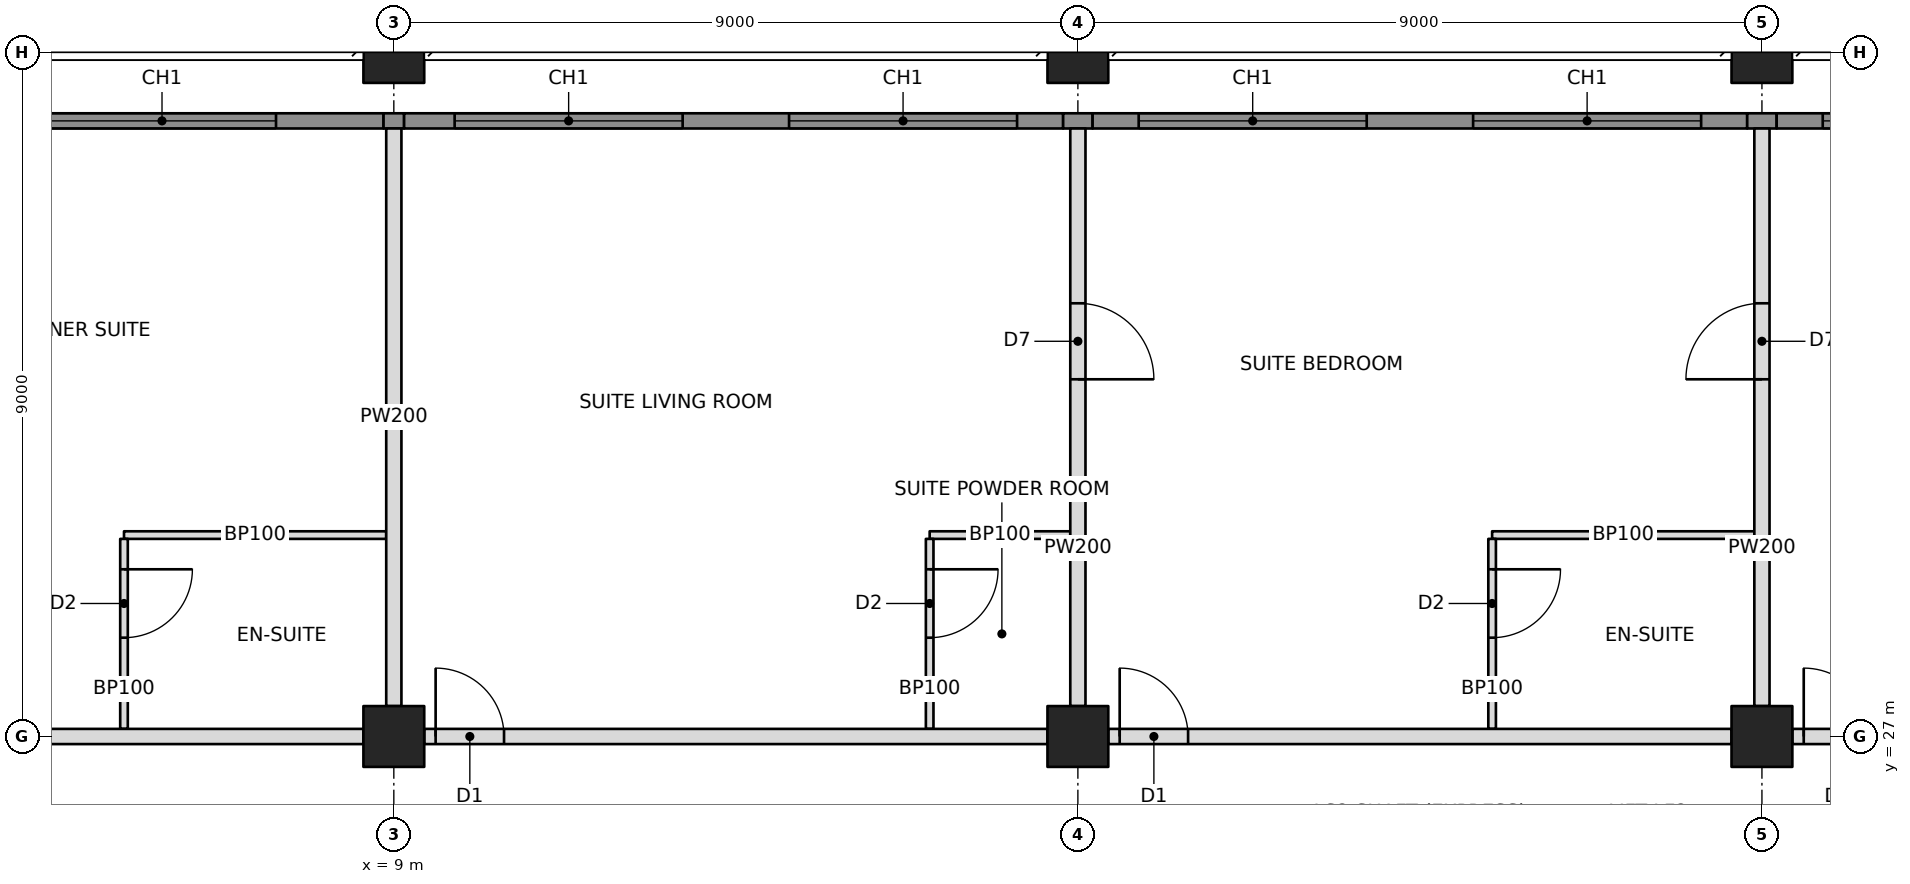
"""IFC4 building model, lengths in metres.
Left out: names, types, materials, properties, quantities, classifications, styles, units other than length and angle.
Written with IfcOpenShell. Run it as: python <this file> out.ifc"""

import sys

from ifc_helpers import new_model, si_unit, direction, frame, frame_2d, origin, origin_2d, place, context, subcontext, project, spatial, rectangle, hollow_rectangle, extrude, element, fill, save


model = new_model("IFC4")
c1 = context("Model", 3, precision=1e-05, world=origin(), true_north=direction((0.0, 1.0)))
c2 = subcontext(c1, "Body", "Model", "MODEL_VIEW")
j1 = project(units=[si_unit("LENGTHUNIT", "METRE"), si_unit("PLANEANGLEUNIT", "RADIAN")], contexts=[c1])
p1 = place(None, origin())
s1 = spatial("IfcSite", under=j1, at=p1, CompositionType="ELEMENT")
p2 = place(p1, origin())
s2 = spatial("IfcBuilding", under=s1, at=p2, CompositionType="ELEMENT")
p3 = place(p2, frame((0.0, 0.0, 28.0)))
s3 = spatial("IfcBuildingStorey", under=s2, at=p3, CompositionType="ELEMENT", Elevation=28.0)
for number, where, z_axis, x_axis in (
    (1, (9.0, 27.0, 0.0), (0.0, 0.0, 1.0), (1.0, 0.0, 0.0)),
    (2, (9.0, 36.0, 0.0), (0.0, 0.0, 1.0), (1.0, 0.0, 0.0)),
    (3, (18.0, 27.0, 0.0), (0.0, 0.0, 1.0), (1.0, 0.0, 0.0)),
    (4, (18.0, 36.0, 0.0), (0.0, 0.0, 1.0), (1.0, 0.0, 0.0)),
    (5, (27.0, 27.0, 0.0), (0.0, 0.0, 1.0), (1.0, 0.0, 0.0)),
    (6, (27.0, 36.0, 0.0), (0.0, 0.0, 1.0), (1.0, 0.0, 0.0)),
):
    element("IfcColumn", number, at=place(p3, frame(where, z_axis=z_axis, x_axis=x_axis)), inside=s3, PredefinedType="COLUMN", context=c2, shape_type="SweptSolid", body=[
        extrude(hollow_rectangle(XDim=0.8, YDim=0.8, WallThickness=0.1, at=origin_2d()), origin(), (0.0, 0.0, 1.0), 3.4),
    ])
p4 = place(p3, frame((3.0, 35.1, 0.0), z_axis=(0.0, 0.0, 1.0), x_axis=(1.0, 0.0, 0.0)))
e7 = element("IfcWall", 7, at=p4, inside=s3, PredefinedType="SOLIDWALL", context=c2, shape_type="SweptSolid", body=[
    extrude(rectangle(XDim=5.865, YDim=0.2, at=frame_2d((2.932, 0.0))), origin(), (0.0, 0.0, 1.0), 3.2),
])
p5 = place(p4, frame((1.45, 0.0, 0.6)))
e8 = element("IfcOpeningElement", 8, at=p5, cuts=e7, PredefinedType="OPENING", context=c2, shape_type="SweptSolid", body=[
    extrude(rectangle(XDim=3.0, YDim=2.2, at=frame_2d((1.5, 1.1))), frame((0.0, 0.11, 0.0), z_axis=(0.0, -1.0, 0.0), x_axis=(1.0, 0.0, 0.0)), (0.0, 0.0, 1.0), 0.22),
])
p6 = place(p3, frame((1.0, 27.0, 0.0), z_axis=(0.0, 0.0, 1.0), x_axis=(1.0, 0.0, 0.0)))
e9 = element("IfcWall", 9, at=p6, inside=s3, PredefinedType="PARTITIONING", context=c2, shape_type="SweptSolid", body=[
    extrude(rectangle(XDim=7.6, YDim=0.2, at=frame_2d((3.8, 0.0))), origin(), (0.0, 0.0, 1.0), 2.438),
])
p7 = place(p6, frame((0.25, 0.0, 0.0)))
e10 = element("IfcOpeningElement", 10, at=p7, cuts=e9, PredefinedType="OPENING", context=c2, shape_type="SweptSolid", body=[
    extrude(rectangle(XDim=0.9, YDim=2.1, at=frame_2d((0.45, 1.05))), frame((0.0, 0.11, 0.0), z_axis=(0.0, -1.0, 0.0), x_axis=(1.0, 0.0, 0.0)), (0.0, 0.0, 1.0), 0.22),
])
p8 = place(p3, frame((9.4, 27.0, 0.0), z_axis=(0.0, 0.0, 1.0), x_axis=(1.0, 0.0, 0.0)))
e11 = element("IfcWall", 11, at=p8, inside=s3, PredefinedType="PARTITIONING", context=c2, shape_type="SweptSolid", body=[
    extrude(rectangle(XDim=8.2, YDim=0.2, at=frame_2d((4.1, 0.0))), origin(), (0.0, 0.0, 1.0), 2.405),
])
p9 = place(p8, frame((0.15, 0.0, 0.0)))
e12 = element("IfcOpeningElement", 12, at=p9, cuts=e11, PredefinedType="OPENING", context=c2, shape_type="SweptSolid", body=[
    extrude(rectangle(XDim=0.9, YDim=2.1, at=frame_2d((0.45, 1.05))), frame((0.0, 0.11, 0.0), z_axis=(0.0, -1.0, 0.0), x_axis=(1.0, 0.0, 0.0)), (0.0, 0.0, 1.0), 0.22),
])
p10 = place(p3, frame((18.4, 27.0, 0.0), z_axis=(0.0, 0.0, 1.0), x_axis=(1.0, 0.0, 0.0)))
e13 = element("IfcWall", 13, at=p10, inside=s3, PredefinedType="PARTITIONING", context=c2, shape_type="SweptSolid", body=[
    extrude(rectangle(XDim=8.2, YDim=0.2, at=frame_2d((4.1, 0.0))), origin(), (0.0, 0.0, 1.0), 2.405),
])
p11 = place(p10, frame((0.15, 0.0, 0.0)))
e14 = element("IfcOpeningElement", 14, at=p11, cuts=e13, PredefinedType="OPENING", context=c2, shape_type="SweptSolid", body=[
    extrude(rectangle(XDim=0.9, YDim=2.1, at=frame_2d((0.45, 1.05))), frame((0.0, 0.11, 0.0), z_axis=(0.0, -1.0, 0.0), x_axis=(1.0, 0.0, 0.0)), (0.0, 0.0, 1.0), 0.22),
])
p12 = place(p3, frame((27.4, 27.0, 0.0), z_axis=(0.0, 0.0, 1.0), x_axis=(1.0, 0.0, 0.0)))
e15 = element("IfcWall", 15, at=p12, inside=s3, PredefinedType="PARTITIONING", context=c2, shape_type="SweptSolid", body=[
    extrude(rectangle(XDim=8.2, YDim=0.2, at=frame_2d((4.1, 0.0))), origin(), (0.0, 0.0, 1.0), 2.405),
])
p13 = place(p12, frame((0.15, 0.0, 0.0)))
e16 = element("IfcOpeningElement", 16, at=p13, cuts=e15, PredefinedType="OPENING", context=c2, shape_type="SweptSolid", body=[
    extrude(rectangle(XDim=0.9, YDim=2.1, at=frame_2d((0.45, 1.05))), frame((0.0, 0.11, 0.0), z_axis=(0.0, -1.0, 0.0), x_axis=(1.0, 0.0, 0.0)), (0.0, 0.0, 1.0), 0.22),
])
p14 = place(p3, frame((9.0, 27.4, 0.0), z_axis=(0.0, 0.0, 1.0), x_axis=(0.0, 1.0, 0.0)))
e17 = element("IfcWall", 17, at=p14, inside=s3, PredefinedType="PARTITIONING", context=c2, shape_type="SweptSolid", body=[
    extrude(rectangle(XDim=7.6, YDim=0.2, at=frame_2d((3.8, 0.0))), origin(), (0.0, 0.0, 1.0), 2.438),
])
p15 = place(p3, frame((18.0, 27.4, 0.0), z_axis=(0.0, 0.0, 1.0), x_axis=(0.0, 1.0, 0.0)))
e18 = element("IfcWall", 18, at=p15, inside=s3, PredefinedType="PARTITIONING", context=c2, shape_type="SweptSolid", body=[
    extrude(rectangle(XDim=7.6, YDim=0.2, at=frame_2d((3.8, 0.0))), origin(), (0.0, 0.0, 1.0), 2.405),
])
p16 = place(p15, frame((4.3, 0.0, 0.0)))
e19 = element("IfcOpeningElement", 19, at=p16, cuts=e18, PredefinedType="OPENING", context=c2, shape_type="SweptSolid", body=[
    extrude(rectangle(XDim=1.0, YDim=2.1, at=frame_2d((0.5, 1.05))), frame((0.0, 0.11, 0.0), z_axis=(0.0, -1.0, 0.0), x_axis=(1.0, 0.0, 0.0)), (0.0, 0.0, 1.0), 0.22),
])
p17 = place(p3, frame((27.0, 27.4, 0.0), z_axis=(0.0, 0.0, 1.0), x_axis=(0.0, 1.0, 0.0)))
e20 = element("IfcWall", 20, at=p17, inside=s3, PredefinedType="PARTITIONING", context=c2, shape_type="SweptSolid", body=[
    extrude(rectangle(XDim=7.6, YDim=0.2, at=frame_2d((3.8, 0.0))), origin(), (0.0, 0.0, 1.0), 2.405),
])
p18 = place(p17, frame((4.3, 0.0, 0.0)))
e21 = element("IfcOpeningElement", 21, at=p18, cuts=e20, PredefinedType="OPENING", context=c2, shape_type="SweptSolid", body=[
    extrude(rectangle(XDim=1.0, YDim=2.1, at=frame_2d((0.5, 1.05))), frame((0.0, 0.11, 0.0), z_axis=(0.0, -1.0, 0.0), x_axis=(1.0, 0.0, 0.0)), (0.0, 0.0, 1.0), 0.22),
])
p19 = place(p3, frame((5.45, 29.65, 0.0), z_axis=(0.0, 0.0, 1.0), x_axis=(1.0, 0.0, 0.0)))
e22 = element("IfcWall", 22, at=p19, inside=s3, PredefinedType="PARTITIONING", context=c2, shape_type="SweptSolid", body=[
    extrude(rectangle(XDim=3.45, YDim=0.1, at=frame_2d((1.725, 0.0))), origin(), (0.0, 0.0, 1.0), 2.438),
])
p20 = place(p3, frame((5.45, 27.1, 0.0), z_axis=(0.0, 0.0, 1.0), x_axis=(0.0, 1.0, 0.0)))
e23 = element("IfcWall", 23, at=p20, inside=s3, PredefinedType="PARTITIONING", context=c2, shape_type="SweptSolid", body=[
    extrude(rectangle(XDim=2.5, YDim=0.1, at=frame_2d((1.25, 0.0))), origin(), (0.0, 0.0, 1.0), 2.438),
])
p21 = place(p20, frame((1.2, 0.0, 0.0)))
e24 = element("IfcOpeningElement", 24, at=p21, cuts=e23, PredefinedType="OPENING", context=c2, shape_type="SweptSolid", body=[
    extrude(rectangle(XDim=0.9, YDim=2.1, at=frame_2d((0.45, 1.05))), frame((0.0, 0.06, 0.0), z_axis=(0.0, -1.0, 0.0), x_axis=(1.0, 0.0, 0.0)), (0.0, 0.0, 1.0), 0.12),
])
p22 = place(p3, frame((16.05, 29.65, 0.0), z_axis=(0.0, 0.0, 1.0), x_axis=(1.0, 0.0, 0.0)))
e25 = element("IfcWall", 25, at=p22, inside=s3, PredefinedType="PARTITIONING", context=c2, shape_type="SweptSolid", body=[
    extrude(rectangle(XDim=1.85, YDim=0.1, at=frame_2d((0.925, 0.0))), origin(), (0.0, 0.0, 1.0), 2.404),
])
p23 = place(p3, frame((16.05, 27.1, 0.0), z_axis=(0.0, 0.0, 1.0), x_axis=(0.0, 1.0, 0.0)))
e26 = element("IfcWall", 26, at=p23, inside=s3, PredefinedType="PARTITIONING", context=c2, shape_type="SweptSolid", body=[
    extrude(rectangle(XDim=2.5, YDim=0.1, at=frame_2d((1.25, 0.0))), origin(), (0.0, 0.0, 1.0), 2.404),
])
p24 = place(p23, frame((1.2, 0.0, 0.0)))
e27 = element("IfcOpeningElement", 27, at=p24, cuts=e26, PredefinedType="OPENING", context=c2, shape_type="SweptSolid", body=[
    extrude(rectangle(XDim=0.9, YDim=2.1, at=frame_2d((0.45, 1.05))), frame((0.0, 0.06, 0.0), z_axis=(0.0, -1.0, 0.0), x_axis=(1.0, 0.0, 0.0)), (0.0, 0.0, 1.0), 0.12),
])
p25 = place(p3, frame((23.45, 29.65, 0.0), z_axis=(0.0, 0.0, 1.0), x_axis=(1.0, 0.0, 0.0)))
e28 = element("IfcWall", 28, at=p25, inside=s3, PredefinedType="PARTITIONING", context=c2, shape_type="SweptSolid", body=[
    extrude(rectangle(XDim=3.45, YDim=0.1, at=frame_2d((1.725, 0.0))), origin(), (0.0, 0.0, 1.0), 2.404),
])
p26 = place(p3, frame((23.45, 27.1, 0.0), z_axis=(0.0, 0.0, 1.0), x_axis=(0.0, 1.0, 0.0)))
e29 = element("IfcWall", 29, at=p26, inside=s3, PredefinedType="PARTITIONING", context=c2, shape_type="SweptSolid", body=[
    extrude(rectangle(XDim=2.5, YDim=0.1, at=frame_2d((1.25, 0.0))), origin(), (0.0, 0.0, 1.0), 2.404),
])
p27 = place(p26, frame((1.2, 0.0, 0.0)))
e30 = element("IfcOpeningElement", 30, at=p27, cuts=e29, PredefinedType="OPENING", context=c2, shape_type="SweptSolid", body=[
    extrude(rectangle(XDim=0.9, YDim=2.1, at=frame_2d((0.45, 1.05))), frame((0.0, 0.06, 0.0), z_axis=(0.0, -1.0, 0.0), x_axis=(1.0, 0.0, 0.0)), (0.0, 0.0, 1.0), 0.12),
])
p28 = place(p3, frame((8.865, 35.1, 0.0), z_axis=(0.0, 0.0, 1.0), x_axis=(1.0, 0.0, 0.0)))
e31 = element("IfcWall", 31, at=p28, inside=s3, PredefinedType="SOLIDWALL", context=c2, shape_type="SweptSolid", body=[
    extrude(rectangle(XDim=0.271, YDim=0.2, at=frame_2d((0.135, 0.0))), origin(), (0.0, 0.0, 1.0), 2.438),
])
p29 = place(p3, frame((9.135, 35.1, 0.0), z_axis=(0.0, 0.0, 1.0), x_axis=(1.0, 0.0, 0.0)))
e32 = element("IfcWall", 32, at=p29, inside=s3, PredefinedType="SOLIDWALL", context=c2, shape_type="SweptSolid", body=[
    extrude(rectangle(XDim=8.671, YDim=0.2, at=frame_2d((4.335, 0.0))), origin(), (0.0, 0.0, 1.0), 3.2),
])
p30 = place(p29, frame((0.665, 0.0, 0.6)))
e33 = element("IfcOpeningElement", 33, at=p30, cuts=e32, PredefinedType="OPENING", context=c2, shape_type="SweptSolid", body=[
    extrude(rectangle(XDim=3.0, YDim=2.2, at=frame_2d((1.5, 1.1))), frame((0.0, 0.11, 0.0), z_axis=(0.0, -1.0, 0.0), x_axis=(1.0, 0.0, 0.0)), (0.0, 0.0, 1.0), 0.22),
])
p31 = place(p29, frame((5.065, 0.0, 0.6)))
e34 = element("IfcOpeningElement", 34, at=p31, cuts=e32, PredefinedType="OPENING", context=c2, shape_type="SweptSolid", body=[
    extrude(rectangle(XDim=3.0, YDim=2.2, at=frame_2d((1.5, 1.1))), frame((0.0, 0.11, 0.0), z_axis=(0.0, -1.0, 0.0), x_axis=(1.0, 0.0, 0.0)), (0.0, 0.0, 1.0), 0.22),
])
p32 = place(p3, frame((17.806, 35.1, 0.0), z_axis=(0.0, 0.0, 1.0), x_axis=(1.0, 0.0, 0.0)))
e35 = element("IfcWall", 35, at=p32, inside=s3, PredefinedType="SOLIDWALL", context=c2, shape_type="SweptSolid", body=[
    extrude(rectangle(XDim=0.388, YDim=0.2, at=frame_2d((0.194, 0.0))), origin(), (0.0, 0.0, 1.0), 2.404),
])
p33 = place(p3, frame((18.194, 35.1, 0.0), z_axis=(0.0, 0.0, 1.0), x_axis=(1.0, 0.0, 0.0)))
e36 = element("IfcWall", 36, at=p33, inside=s3, PredefinedType="SOLIDWALL", context=c2, shape_type="SweptSolid", body=[
    extrude(rectangle(XDim=8.612, YDim=0.2, at=frame_2d((4.306, 0.0))), origin(), (0.0, 0.0, 1.0), 3.2),
])
p34 = place(p33, frame((0.606, 0.0, 0.6)))
e37 = element("IfcOpeningElement", 37, at=p34, cuts=e36, PredefinedType="OPENING", context=c2, shape_type="SweptSolid", body=[
    extrude(rectangle(XDim=3.0, YDim=2.2, at=frame_2d((1.5, 1.1))), frame((0.0, 0.11, 0.0), z_axis=(0.0, -1.0, 0.0), x_axis=(1.0, 0.0, 0.0)), (0.0, 0.0, 1.0), 0.22),
])
p35 = place(p33, frame((5.006, 0.0, 0.6)))
e38 = element("IfcOpeningElement", 38, at=p35, cuts=e36, PredefinedType="OPENING", context=c2, shape_type="SweptSolid", body=[
    extrude(rectangle(XDim=3.0, YDim=2.2, at=frame_2d((1.5, 1.1))), frame((0.0, 0.11, 0.0), z_axis=(0.0, -1.0, 0.0), x_axis=(1.0, 0.0, 0.0)), (0.0, 0.0, 1.0), 0.22),
])
p36 = place(p3, frame((26.806, 35.1, 0.0), z_axis=(0.0, 0.0, 1.0), x_axis=(1.0, 0.0, 0.0)))
e39 = element("IfcWall", 39, at=p36, inside=s3, PredefinedType="SOLIDWALL", context=c2, shape_type="SweptSolid", body=[
    extrude(rectangle(XDim=0.388, YDim=0.2, at=frame_2d((0.194, 0.0))), origin(), (0.0, 0.0, 1.0), 2.404),
])
p37 = place(p3, frame((27.194, 35.1, 0.0), z_axis=(0.0, 0.0, 1.0), x_axis=(1.0, 0.0, 0.0)))
e40 = element("IfcWall", 40, at=p37, inside=s3, PredefinedType="SOLIDWALL", context=c2, shape_type="SweptSolid", body=[
    extrude(rectangle(XDim=8.671, YDim=0.2, at=frame_2d((4.335, 0.0))), origin(), (0.0, 0.0, 1.0), 3.2),
])
p38 = place(p37, frame((0.606, 0.0, 0.6)))
e41 = element("IfcOpeningElement", 41, at=p38, cuts=e40, PredefinedType="OPENING", context=c2, shape_type="SweptSolid", body=[
    extrude(rectangle(XDim=3.0, YDim=2.2, at=frame_2d((1.5, 1.1))), frame((0.0, 0.11, 0.0), z_axis=(0.0, -1.0, 0.0), x_axis=(1.0, 0.0, 0.0)), (0.0, 0.0, 1.0), 0.22),
])
p39 = place(p37, frame((5.006, 0.0, 0.6)))
e42 = element("IfcOpeningElement", 42, at=p39, cuts=e40, PredefinedType="OPENING", context=c2, shape_type="SweptSolid", body=[
    extrude(rectangle(XDim=3.0, YDim=2.2, at=frame_2d((1.5, 1.1))), frame((0.0, 0.11, 0.0), z_axis=(0.0, -1.0, 0.0), x_axis=(1.0, 0.0, 0.0)), (0.0, 0.0, 1.0), 0.22),
])
p40 = place(p5, origin())
e43 = element("IfcWindow", 43, at=p40, inside=s3, PartitioningType="TRIPLE_PANEL_VERTICAL", PredefinedType="WINDOW", context=c2, shape_type="SweptSolid", body=[
    extrude(rectangle(XDim=3.0, YDim=2.2, at=frame_2d((1.5, 1.1))), frame((0.0, 0.03, 0.0), z_axis=(0.0, -1.0, 0.0), x_axis=(1.0, 0.0, 0.0)), (0.0, 0.0, 1.0), 0.06),
])
fill(e8, e43)
p41 = place(p30, origin())
e44 = element("IfcWindow", 44, at=p41, inside=s3, PartitioningType="TRIPLE_PANEL_VERTICAL", PredefinedType="WINDOW", context=c2, shape_type="SweptSolid", body=[
    extrude(rectangle(XDim=3.0, YDim=2.2, at=frame_2d((1.5, 1.1))), frame((0.0, 0.03, 0.0), z_axis=(0.0, -1.0, 0.0), x_axis=(1.0, 0.0, 0.0)), (0.0, 0.0, 1.0), 0.06),
])
fill(e33, e44)
p42 = place(p31, origin())
e45 = element("IfcWindow", 45, at=p42, inside=s3, PartitioningType="TRIPLE_PANEL_VERTICAL", PredefinedType="WINDOW", context=c2, shape_type="SweptSolid", body=[
    extrude(rectangle(XDim=3.0, YDim=2.2, at=frame_2d((1.5, 1.1))), frame((0.0, 0.03, 0.0), z_axis=(0.0, -1.0, 0.0), x_axis=(1.0, 0.0, 0.0)), (0.0, 0.0, 1.0), 0.06),
])
fill(e34, e45)
p43 = place(p34, origin())
e46 = element("IfcWindow", 46, at=p43, inside=s3, PartitioningType="TRIPLE_PANEL_VERTICAL", PredefinedType="WINDOW", context=c2, shape_type="SweptSolid", body=[
    extrude(rectangle(XDim=3.0, YDim=2.2, at=frame_2d((1.5, 1.1))), frame((0.0, 0.03, 0.0), z_axis=(0.0, -1.0, 0.0), x_axis=(1.0, 0.0, 0.0)), (0.0, 0.0, 1.0), 0.06),
])
fill(e37, e46)
p44 = place(p35, origin())
e47 = element("IfcWindow", 47, at=p44, inside=s3, PartitioningType="TRIPLE_PANEL_VERTICAL", PredefinedType="WINDOW", context=c2, shape_type="SweptSolid", body=[
    extrude(rectangle(XDim=3.0, YDim=2.2, at=frame_2d((1.5, 1.1))), frame((0.0, 0.03, 0.0), z_axis=(0.0, -1.0, 0.0), x_axis=(1.0, 0.0, 0.0)), (0.0, 0.0, 1.0), 0.06),
])
fill(e38, e47)
p45 = place(p38, origin())
e48 = element("IfcWindow", 48, at=p45, inside=s3, PartitioningType="TRIPLE_PANEL_VERTICAL", PredefinedType="WINDOW", context=c2, shape_type="SweptSolid", body=[
    extrude(rectangle(XDim=3.0, YDim=2.2, at=frame_2d((1.5, 1.1))), frame((0.0, 0.03, 0.0), z_axis=(0.0, -1.0, 0.0), x_axis=(1.0, 0.0, 0.0)), (0.0, 0.0, 1.0), 0.06),
])
fill(e41, e48)
p46 = place(p16, frame((1.0, 0.0, 0.0), z_axis=(0.0, 0.0, 1.0), x_axis=(-1.0, 0.0, 0.0)))
e49 = element("IfcDoor", 49, at=p46, inside=s3, OperationType="SINGLE_SWING_RIGHT", PredefinedType="DOOR", context=c2, shape_type="SweptSolid", body=[
    extrude(rectangle(XDim=1.0, YDim=2.1, at=frame_2d((0.5, 1.05))), frame((0.0, 0.025, 0.0), z_axis=(0.0, -1.0, 0.0), x_axis=(1.0, 0.0, 0.0)), (0.0, 0.0, 1.0), 0.05),
])
fill(e19, e49)
p47 = place(p18, origin())
e50 = element("IfcDoor", 50, at=p47, inside=s3, OperationType="SINGLE_SWING_LEFT", PredefinedType="DOOR", context=c2, shape_type="SweptSolid", body=[
    extrude(rectangle(XDim=1.0, YDim=2.1, at=frame_2d((0.5, 1.05))), frame((0.0, 0.025, 0.0), z_axis=(0.0, -1.0, 0.0), x_axis=(1.0, 0.0, 0.0)), (0.0, 0.0, 1.0), 0.05),
])
fill(e21, e50)
p48 = place(p21, frame((0.9, 0.0, 0.0), z_axis=(0.0, 0.0, 1.0), x_axis=(-1.0, 0.0, 0.0)))
e51 = element("IfcDoor", 51, at=p48, inside=s3, OperationType="SINGLE_SWING_LEFT", PredefinedType="DOOR", context=c2, shape_type="SweptSolid", body=[
    extrude(rectangle(XDim=0.9, YDim=2.1, at=frame_2d((0.45, 1.05))), frame((0.0, 0.025, 0.0), z_axis=(0.0, -1.0, 0.0), x_axis=(1.0, 0.0, 0.0)), (0.0, 0.0, 1.0), 0.05),
])
fill(e24, e51)
p49 = place(p24, frame((0.9, 0.0, 0.0), z_axis=(0.0, 0.0, 1.0), x_axis=(-1.0, 0.0, 0.0)))
e52 = element("IfcDoor", 52, at=p49, inside=s3, OperationType="SINGLE_SWING_LEFT", PredefinedType="DOOR", context=c2, shape_type="SweptSolid", body=[
    extrude(rectangle(XDim=0.9, YDim=2.1, at=frame_2d((0.45, 1.05))), frame((0.0, 0.025, 0.0), z_axis=(0.0, -1.0, 0.0), x_axis=(1.0, 0.0, 0.0)), (0.0, 0.0, 1.0), 0.05),
])
fill(e27, e52)
p50 = place(p9, origin())
e53 = element("IfcDoor", 53, at=p50, inside=s3, OperationType="SINGLE_SWING_LEFT", PredefinedType="DOOR", context=c2, shape_type="SweptSolid", body=[
    extrude(rectangle(XDim=0.9, YDim=2.1, at=frame_2d((0.45, 1.05))), frame((0.0, 0.025, 0.0), z_axis=(0.0, -1.0, 0.0), x_axis=(1.0, 0.0, 0.0)), (0.0, 0.0, 1.0), 0.05),
])
fill(e12, e53)
p51 = place(p27, frame((0.9, 0.0, 0.0), z_axis=(0.0, 0.0, 1.0), x_axis=(-1.0, 0.0, 0.0)))
e54 = element("IfcDoor", 54, at=p51, inside=s3, OperationType="SINGLE_SWING_LEFT", PredefinedType="DOOR", context=c2, shape_type="SweptSolid", body=[
    extrude(rectangle(XDim=0.9, YDim=2.1, at=frame_2d((0.45, 1.05))), frame((0.0, 0.025, 0.0), z_axis=(0.0, -1.0, 0.0), x_axis=(1.0, 0.0, 0.0)), (0.0, 0.0, 1.0), 0.05),
])
fill(e30, e54)
p52 = place(p11, origin())
e55 = element("IfcDoor", 55, at=p52, inside=s3, OperationType="SINGLE_SWING_LEFT", PredefinedType="DOOR", context=c2, shape_type="SweptSolid", body=[
    extrude(rectangle(XDim=0.9, YDim=2.1, at=frame_2d((0.45, 1.05))), frame((0.0, 0.025, 0.0), z_axis=(0.0, -1.0, 0.0), x_axis=(1.0, 0.0, 0.0)), (0.0, 0.0, 1.0), 0.05),
])
fill(e14, e55)
p53 = place(p13, origin())
e56 = element("IfcDoor", 56, at=p53, inside=s3, OperationType="SINGLE_SWING_LEFT", PredefinedType="DOOR", context=c2, shape_type="SweptSolid", body=[
    extrude(rectangle(XDim=0.9, YDim=2.1, at=frame_2d((0.45, 1.05))), frame((0.0, 0.025, 0.0), z_axis=(0.0, -1.0, 0.0), x_axis=(1.0, 0.0, 0.0)), (0.0, 0.0, 1.0), 0.05),
])
fill(e16, e56)
save(model, sys.argv[1])
